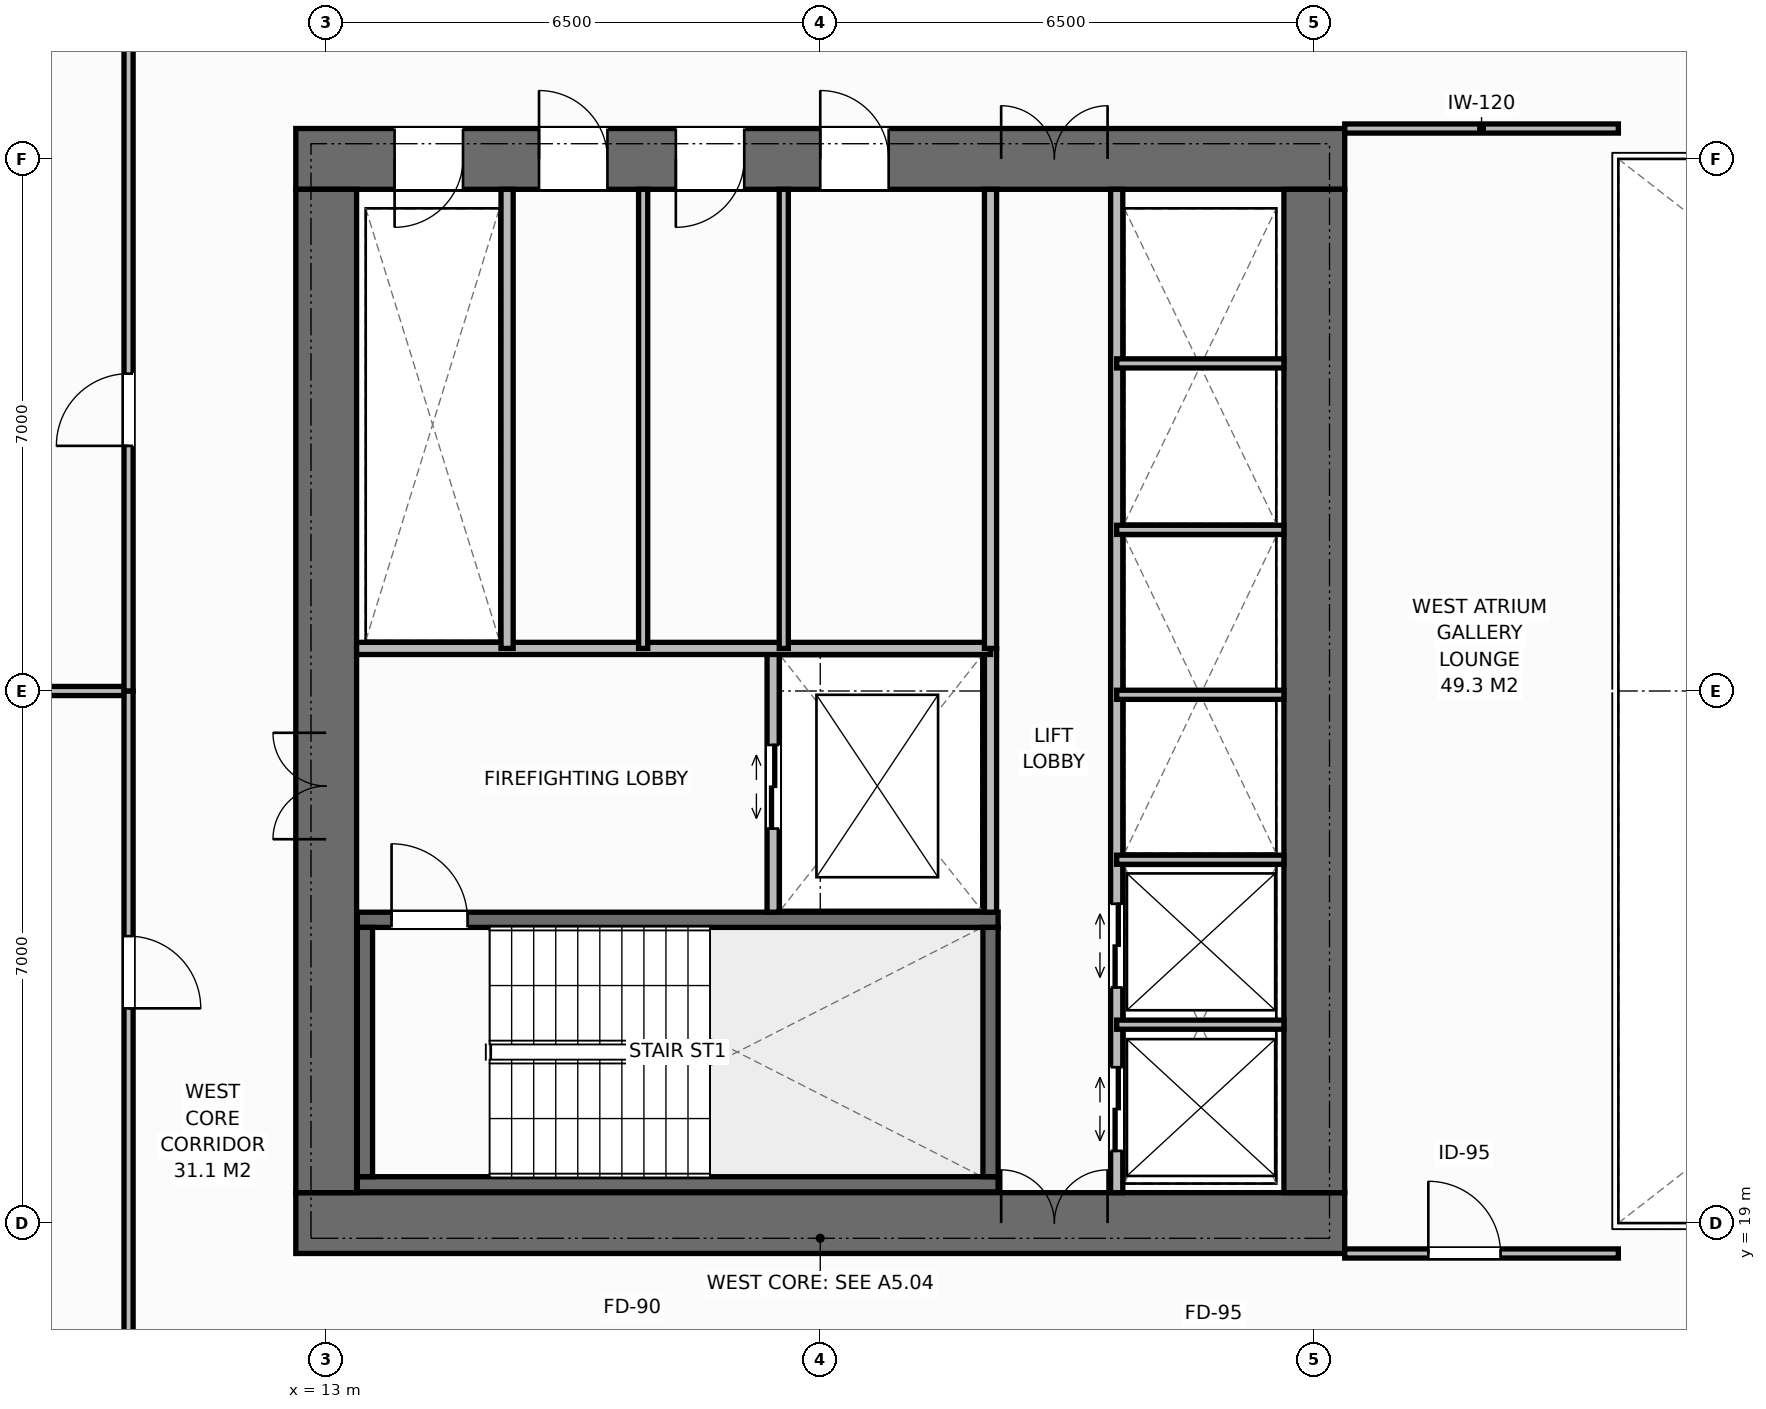
"""IFC4 building model, lengths in metres.
Left out: names, types, materials, properties, quantities, classifications, styles, units other than length and angle.
Written with IfcOpenShell. Run it as: python <this file> out.ifc"""

import sys

from ifc_helpers import new_model, si_unit, direction, frame, frame_2d, origin, place, context, subcontext, project, spatial, rectangle, extrude, element, fill, save


model = new_model("IFC4")
c1 = context("Model", 3, precision=1e-05, world=origin(), true_north=direction((0.0, 1.0)))
c2 = subcontext(c1, "Body", "Model", "MODEL_VIEW")
j1 = project(units=[si_unit("LENGTHUNIT", "METRE"), si_unit("PLANEANGLEUNIT", "RADIAN")], contexts=[c1])
p1 = place(None, origin())
s1 = spatial("IfcSite", under=j1, at=p1, CompositionType="ELEMENT")
p2 = place(p1, origin())
s2 = spatial("IfcBuilding", under=s1, at=p2, CompositionType="ELEMENT")
p3 = place(p2, frame((0.0, 0.0, 43.0)))
s3 = spatial("IfcBuildingStorey", under=s2, at=p3, CompositionType="ELEMENT", Elevation=43.0)
p4 = place(p3, frame((12.6, 19.0, 0.0), z_axis=(0.0, 0.0, 1.0), x_axis=(1.0, 0.0, 0.0)))
e1 = element("IfcWall", 1, at=p4, inside=s3, PredefinedType="SHEAR", context=c2, shape_type="SweptSolid", body=[
    extrude(rectangle(XDim=13.8, YDim=0.8, at=frame_2d((6.9, 0.0))), origin(), (0.0, 0.0, 1.0), 3.8),
])
p5 = place(p4, frame((9.28, 0.0, 0.0)))
e2 = element("IfcOpeningElement", 2, at=p5, cuts=e1, PredefinedType="OPENING", context=c2, shape_type="SweptSolid", body=[
    extrude(rectangle(XDim=1.4, YDim=2.2, at=frame_2d((0.7, 1.1))), frame((0.0, 0.41, 0.0), z_axis=(0.0, -1.0, 0.0), x_axis=(1.0, 0.0, 0.0)), (0.0, 0.0, 1.0), 0.82),
])
p6 = place(p3, frame((12.6, 33.0, 0.0), z_axis=(0.0, 0.0, 1.0), x_axis=(1.0, 0.0, 0.0)))
e3 = element("IfcWall", 3, at=p6, inside=s3, PredefinedType="SHEAR", context=c2, shape_type="SweptSolid", body=[
    extrude(rectangle(XDim=13.8, YDim=0.8, at=frame_2d((6.9, 0.0))), origin(), (0.0, 0.0, 1.0), 3.8),
])
p7 = place(p6, frame((1.3, 0.0, 0.0)))
e4 = element("IfcOpeningElement", 4, at=p7, cuts=e3, PredefinedType="OPENING", context=c2, shape_type="SweptSolid", body=[
    extrude(rectangle(XDim=0.9, YDim=2.15, at=frame_2d((0.45, 1.075))), frame((0.0, 0.41, 0.0), z_axis=(0.0, -1.0, 0.0), x_axis=(1.0, 0.0, 0.0)), (0.0, 0.0, 1.0), 0.82),
])
p8 = place(p6, frame((3.2, 0.0, 0.0)))
e5 = element("IfcOpeningElement", 5, at=p8, cuts=e3, PredefinedType="OPENING", context=c2, shape_type="SweptSolid", body=[
    extrude(rectangle(XDim=0.9, YDim=2.15, at=frame_2d((0.45, 1.075))), frame((0.0, 0.41, 0.0), z_axis=(0.0, -1.0, 0.0), x_axis=(1.0, 0.0, 0.0)), (0.0, 0.0, 1.0), 0.82),
])
p9 = place(p6, frame((5.0, 0.0, 0.0)))
e6 = element("IfcOpeningElement", 6, at=p9, cuts=e3, PredefinedType="OPENING", context=c2, shape_type="SweptSolid", body=[
    extrude(rectangle(XDim=0.9, YDim=2.15, at=frame_2d((0.45, 1.075))), frame((0.0, 0.41, 0.0), z_axis=(0.0, -1.0, 0.0), x_axis=(1.0, 0.0, 0.0)), (0.0, 0.0, 1.0), 0.82),
])
p10 = place(p6, frame((6.9, 0.0, 0.0)))
e7 = element("IfcOpeningElement", 7, at=p10, cuts=e3, PredefinedType="OPENING", context=c2, shape_type="SweptSolid", body=[
    extrude(rectangle(XDim=0.9, YDim=2.15, at=frame_2d((0.45, 1.075))), frame((0.0, 0.41, 0.0), z_axis=(0.0, -1.0, 0.0), x_axis=(1.0, 0.0, 0.0)), (0.0, 0.0, 1.0), 0.82),
])
p11 = place(p6, frame((9.28, 0.0, 0.0)))
e8 = element("IfcOpeningElement", 8, at=p11, cuts=e3, PredefinedType="OPENING", context=c2, shape_type="SweptSolid", body=[
    extrude(rectangle(XDim=1.4, YDim=2.2, at=frame_2d((0.7, 1.1))), frame((0.0, 0.41, 0.0), z_axis=(0.0, -1.0, 0.0), x_axis=(1.0, 0.0, 0.0)), (0.0, 0.0, 1.0), 0.82),
])
p12 = place(p3, frame((13.0, 19.4, 0.0), z_axis=(0.0, 0.0, 1.0), x_axis=(0.0, 1.0, 0.0)))
e9 = element("IfcWall", 9, at=p12, inside=s3, PredefinedType="SHEAR", context=c2, shape_type="SweptSolid", body=[
    extrude(rectangle(XDim=13.2, YDim=0.8, at=frame_2d((6.6, 0.0))), origin(), (0.0, 0.0, 1.0), 3.8),
])
p13 = place(p12, frame((4.65, 0.0, 0.0)))
e10 = element("IfcOpeningElement", 10, at=p13, cuts=e9, PredefinedType="OPENING", context=c2, shape_type="SweptSolid", body=[
    extrude(rectangle(XDim=1.4, YDim=2.2, at=frame_2d((0.7, 1.1))), frame((0.0, 0.41, 0.0), z_axis=(0.0, -1.0, 0.0), x_axis=(1.0, 0.0, 0.0)), (0.0, 0.0, 1.0), 0.82),
])
p14 = place(p3, frame((26.0, 19.4, 0.0), z_axis=(0.0, 0.0, 1.0), x_axis=(0.0, 1.0, 0.0)))
e11 = element("IfcWall", 11, at=p14, inside=s3, PredefinedType="SHEAR", context=c2, shape_type="SweptSolid", body=[
    extrude(rectangle(XDim=13.2, YDim=0.8, at=frame_2d((6.6, 0.0))), origin(), (0.0, 0.0, 1.0), 3.8),
])
p15 = place(p3, frame((13.41, 19.51, 0.0), z_axis=(0.0, 0.0, 1.0), x_axis=(1.0, 0.0, 0.0)))
e12 = element("IfcWall", 12, at=p15, inside=s3, PredefinedType="SHEAR", context=c2, shape_type="SweptSolid", body=[
    extrude(rectangle(XDim=8.43, YDim=0.2, at=frame_2d((4.215, 0.0))), origin(), (0.0, 0.0, 1.0), 3.8),
])
p16 = place(p3, frame((13.41, 22.99, 0.0), z_axis=(0.0, 0.0, 1.0), x_axis=(1.0, 0.0, 0.0)))
e13 = element("IfcWall", 13, at=p16, inside=s3, PredefinedType="SHEAR", context=c2, shape_type="SweptSolid", body=[
    extrude(rectangle(XDim=8.43, YDim=0.2, at=frame_2d((4.215, 0.0))), origin(), (0.0, 0.0, 1.0), 3.8),
])
p17 = place(p16, frame((0.45, 0.0, 0.0)))
e14 = element("IfcOpeningElement", 14, at=p17, cuts=e13, PredefinedType="OPENING", context=c2, shape_type="SweptSolid", body=[
    extrude(rectangle(XDim=1.0, YDim=2.15, at=frame_2d((0.5, 1.075))), frame((0.0, 0.11, 0.0), z_axis=(0.0, -1.0, 0.0), x_axis=(1.0, 0.0, 0.0)), (0.0, 0.0, 1.0), 0.22),
])
for number, where, z_axis, x_axis in (
    (15, (13.51, 19.61, 0.0), (0.0, 0.0, 1.0), (0.0, 1.0, 0.0)),
    (16, (21.74, 19.61, 0.0), (0.0, 0.0, 1.0), (0.0, 1.0, 0.0)),
):
    element("IfcWall", number, at=place(p3, frame(where, z_axis=z_axis, x_axis=x_axis)), inside=s3, PredefinedType="SHEAR", context=c2, shape_type="SweptSolid", body=[
        extrude(rectangle(XDim=3.28, YDim=0.2, at=frame_2d((1.64, 0.0))), origin(), (0.0, 0.0, 1.0), 3.8),
    ])
p18 = place(p3, frame((21.74, 23.09, 0.0), z_axis=(0.0, 0.0, 1.0), x_axis=(0.0, 1.0, 0.0)))
e17 = element("IfcWall", 17, at=p18, inside=s3, PredefinedType="STANDARD", context=c2, shape_type="SweptSolid", body=[
    extrude(rectangle(XDim=3.47, YDim=0.16, at=frame_2d((1.735, 0.0))), origin(), (0.0, 0.0, 1.0), 3.55),
])
p19 = place(p3, frame((18.88, 23.09, 0.0), z_axis=(0.0, 0.0, 1.0), x_axis=(0.0, 1.0, 0.0)))
e18 = element("IfcWall", 18, at=p19, inside=s3, PredefinedType="STANDARD", context=c2, shape_type="SweptSolid", body=[
    extrude(rectangle(XDim=3.47, YDim=0.16, at=frame_2d((1.735, 0.0))), origin(), (0.0, 0.0, 1.0), 3.55),
])
p20 = place(p19, frame((1.1, 0.0, 0.0)))
e19 = element("IfcOpeningElement", 19, at=p20, cuts=e18, PredefinedType="OPENING", context=c2, shape_type="SweptSolid", body=[
    extrude(rectangle(XDim=1.1, YDim=2.2, at=frame_2d((0.55, 1.1))), frame((0.0, 0.09, 0.0), z_axis=(0.0, -1.0, 0.0), x_axis=(1.0, 0.0, 0.0)), (0.0, 0.0, 1.0), 0.18),
])
p21 = place(p3, frame((13.4, 26.56, 0.0), z_axis=(0.0, 0.0, 1.0), x_axis=(1.0, 0.0, 0.0)))
e20 = element("IfcWall", 20, at=p21, inside=s3, PredefinedType="STANDARD", context=c2, shape_type="SweptSolid", body=[
    extrude(rectangle(XDim=8.34, YDim=0.16, at=frame_2d((4.17, 0.0))), origin(), (0.0, 0.0, 1.0), 3.55),
])
p22 = place(p3, frame((15.38, 26.56, 0.0), z_axis=(0.0, 0.0, 1.0), x_axis=(0.0, 1.0, 0.0)))
e21 = element("IfcWall", 21, at=p22, inside=s3, PredefinedType="STANDARD", context=c2, shape_type="SweptSolid", body=[
    extrude(rectangle(XDim=6.04, YDim=0.16, at=frame_2d((3.02, 0.0))), origin(), (0.0, 0.0, 1.0), 3.55),
])
for number, where, z_axis, x_axis in (
    (22, (17.17, 26.56, 0.0), (0.0, 0.0, 1.0), (0.0, 1.0, 0.0)),
    (23, (19.02, 26.56, 0.0), (0.0, 0.0, 1.0), (0.0, 1.0, 0.0)),
):
    element("IfcWall", number, at=place(p3, frame(where, z_axis=z_axis, x_axis=x_axis)), inside=s3, PredefinedType="PARTITIONING", context=c2, shape_type="SweptSolid", body=[
        extrude(rectangle(XDim=6.04, YDim=0.12, at=frame_2d((3.02, 0.0))), origin(), (0.0, 0.0, 1.0), 3.55),
    ])
p23 = place(p3, frame((21.74, 26.56, 0.0), z_axis=(0.0, 0.0, 1.0), x_axis=(0.0, 1.0, 0.0)))
e24 = element("IfcWall", 24, at=p23, inside=s3, PredefinedType="STANDARD", context=c2, shape_type="SweptSolid", body=[
    extrude(rectangle(XDim=6.04, YDim=0.16, at=frame_2d((3.02, 0.0))), origin(), (0.0, 0.0, 1.0), 3.55),
])
p24 = place(p3, frame((23.4, 19.4, 0.0), z_axis=(0.0, 0.0, 1.0), x_axis=(0.0, 1.0, 0.0)))
e25 = element("IfcWall", 25, at=p24, inside=s3, PredefinedType="STANDARD", context=c2, shape_type="SweptSolid", body=[
    extrude(rectangle(XDim=13.2, YDim=0.16, at=frame_2d((6.6, 0.0))), origin(), (0.0, 0.0, 1.0), 3.55),
])
p25 = place(p24, frame((0.55, 0.0, 0.0)))
e26 = element("IfcOpeningElement", 26, at=p25, cuts=e25, PredefinedType="OPENING", context=c2, shape_type="SweptSolid", body=[
    extrude(rectangle(XDim=1.1, YDim=2.2, at=frame_2d((0.55, 1.1))), frame((0.0, 0.09, 0.0), z_axis=(0.0, -1.0, 0.0), x_axis=(1.0, 0.0, 0.0)), (0.0, 0.0, 1.0), 0.18),
])
p26 = place(p24, frame((2.7, 0.0, 0.0)))
e27 = element("IfcOpeningElement", 27, at=p26, cuts=e25, PredefinedType="OPENING", context=c2, shape_type="SweptSolid", body=[
    extrude(rectangle(XDim=1.1, YDim=2.2, at=frame_2d((0.55, 1.1))), frame((0.0, 0.09, 0.0), z_axis=(0.0, -1.0, 0.0), x_axis=(1.0, 0.0, 0.0)), (0.0, 0.0, 1.0), 0.18),
])
for number, where, z_axis, x_axis in (
    (28, (23.4, 21.61, 0.0), (0.0, 0.0, 1.0), (1.0, 0.0, 0.0)),
    (29, (23.4, 23.78, 0.0), (0.0, 0.0, 1.0), (1.0, 0.0, 0.0)),
    (30, (23.4, 25.95, 0.0), (0.0, 0.0, 1.0), (1.0, 0.0, 0.0)),
    (31, (23.4, 28.12, 0.0), (0.0, 0.0, 1.0), (1.0, 0.0, 0.0)),
    (32, (23.4, 30.31, 0.0), (0.0, 0.0, 1.0), (1.0, 0.0, 0.0)),
):
    element("IfcWall", number, at=place(p3, frame(where, z_axis=z_axis, x_axis=x_axis)), inside=s3, PredefinedType="PARTITIONING", context=c2, shape_type="SweptSolid", body=[
        extrude(rectangle(XDim=2.2, YDim=0.12, at=frame_2d((1.1, 0.0))), origin(), (0.0, 0.0, 1.0), 3.55),
    ])
p27 = place(p3, frame((26.4, 33.4, 0.0), z_axis=(0.0, 0.0, 1.0), x_axis=(1.0, 0.0, 0.0)))
e33 = element("IfcWall", 33, at=p27, inside=s3, PredefinedType="PARTITIONING", context=c2, shape_type="SweptSolid", body=[
    extrude(rectangle(XDim=3.6, YDim=0.12, at=frame_2d((1.8, 0.0))), origin(), (0.0, 0.0, 1.0), 3.55),
])
p28 = place(p3, frame((26.4, 18.6, 0.0), z_axis=(0.0, 0.0, 1.0), x_axis=(1.0, 0.0, 0.0)))
e34 = element("IfcWall", 34, at=p28, inside=s3, PredefinedType="PARTITIONING", context=c2, shape_type="SweptSolid", body=[
    extrude(rectangle(XDim=3.6, YDim=0.12, at=frame_2d((1.8, 0.0))), origin(), (0.0, 0.0, 1.0), 3.55),
])
p29 = place(p28, frame((1.1, 0.0, 0.0)))
e35 = element("IfcOpeningElement", 35, at=p29, cuts=e34, PredefinedType="OPENING", context=c2, shape_type="SweptSolid", body=[
    extrude(rectangle(XDim=0.95, YDim=2.15, at=frame_2d((0.475, 1.075))), frame((0.0, 0.07, 0.0), z_axis=(0.0, -1.0, 0.0), x_axis=(1.0, 0.0, 0.0)), (0.0, 0.0, 1.0), 0.14),
])
p30 = place(p3, frame((-0.18, 26.0, 0.0), z_axis=(0.0, 0.0, 1.0), x_axis=(1.0, 0.0, 0.0)))
e36 = element("IfcWall", 36, at=p30, inside=s3, PredefinedType="PARTITIONING", context=c2, shape_type="SweptSolid", body=[
    extrude(rectangle(XDim=10.58, YDim=0.12, at=frame_2d((5.29, 0.0))), origin(), (0.0, 0.0, 1.0), 3.55),
])
p31 = place(p3, frame((10.4, 16.5, 0.0), z_axis=(0.0, 0.0, 1.0), x_axis=(0.0, 1.0, 0.0)))
e37 = element("IfcWall", 37, at=p31, inside=s3, PredefinedType="PARTITIONING", context=c2, shape_type="SweptSolid", body=[
    extrude(rectangle(XDim=9.5, YDim=0.12, at=frame_2d((4.75, 0.0))), origin(), (0.0, 0.0, 1.0), 3.55),
])
p32 = place(p31, frame((5.325, 0.0, 0.0)))
e38 = element("IfcOpeningElement", 38, at=p32, cuts=e37, PredefinedType="OPENING", context=c2, shape_type="SweptSolid", body=[
    extrude(rectangle(XDim=0.95, YDim=2.15, at=frame_2d((0.475, 1.075))), frame((0.0, 0.07, 0.0), z_axis=(0.0, -1.0, 0.0), x_axis=(1.0, 0.0, 0.0)), (0.0, 0.0, 1.0), 0.14),
])
p33 = place(p3, frame((10.4, 26.0, 0.0), z_axis=(0.0, 0.0, 1.0), x_axis=(0.0, 1.0, 0.0)))
e39 = element("IfcWall", 39, at=p33, inside=s3, PredefinedType="PARTITIONING", context=c2, shape_type="SweptSolid", body=[
    extrude(rectangle(XDim=9.5, YDim=0.12, at=frame_2d((4.75, 0.0))), origin(), (0.0, 0.0, 1.0), 3.55),
])
p34 = place(p33, frame((3.225, 0.0, 0.0)))
e40 = element("IfcOpeningElement", 40, at=p34, cuts=e39, PredefinedType="OPENING", context=c2, shape_type="SweptSolid", body=[
    extrude(rectangle(XDim=0.95, YDim=2.15, at=frame_2d((0.475, 1.075))), frame((0.0, 0.07, 0.0), z_axis=(0.0, -1.0, 0.0), x_axis=(1.0, 0.0, 0.0)), (0.0, 0.0, 1.0), 0.14),
])
p35 = place(p17, origin())
e41 = element("IfcDoor", 41, at=p35, inside=s3, OperationType="SINGLE_SWING_LEFT", PredefinedType="DOOR", context=c2, shape_type="SweptSolid", body=[
    extrude(rectangle(XDim=1.0, YDim=2.15, at=frame_2d((0.5, 1.075))), frame((0.0, 0.025, 0.0), z_axis=(0.0, -1.0, 0.0), x_axis=(1.0, 0.0, 0.0)), (0.0, 0.0, 1.0), 0.05),
])
fill(e14, e41)
p36 = place(p13, origin())
e42 = element("IfcDoor", 42, at=p36, inside=s3, OperationType="DOUBLE_DOOR_SINGLE_SWING", PredefinedType="DOOR", context=c2, shape_type="SweptSolid", body=[
    extrude(rectangle(XDim=1.4, YDim=2.2, at=frame_2d((0.7, 1.1))), frame((0.0, 0.025, 0.0), z_axis=(0.0, -1.0, 0.0), x_axis=(1.0, 0.0, 0.0)), (0.0, 0.0, 1.0), 0.05),
])
fill(e10, e42)
p37 = place(p20, origin())
e43 = element("IfcDoor", 43, at=p37, inside=s3, OperationType="DOUBLE_DOOR_SLIDING", PredefinedType="DOOR", context=c2, shape_type="SweptSolid", body=[
    extrude(rectangle(XDim=1.1, YDim=2.2, at=frame_2d((0.55, 1.1))), frame((0.0, 0.025, 0.0), z_axis=(0.0, -1.0, 0.0), x_axis=(1.0, 0.0, 0.0)), (0.0, 0.0, 1.0), 0.05),
])
fill(e19, e43)
p38 = place(p7, origin())
e44 = element("IfcDoor", 44, at=p38, inside=s3, OperationType="SINGLE_SWING_RIGHT", PredefinedType="DOOR", context=c2, shape_type="SweptSolid", body=[
    extrude(rectangle(XDim=0.9, YDim=2.15, at=frame_2d((0.45, 1.075))), frame((0.0, -0.075, 0.0), z_axis=(0.0, -1.0, 0.0), x_axis=(1.0, 0.0, 0.0)), (0.0, 0.0, 1.0), 0.05),
])
fill(e4, e44)
p39 = place(p8, origin())
e45 = element("IfcDoor", 45, at=p39, inside=s3, OperationType="SINGLE_SWING_LEFT", PredefinedType="DOOR", context=c2, shape_type="SweptSolid", body=[
    extrude(rectangle(XDim=0.9, YDim=2.15, at=frame_2d((0.45, 1.075))), frame((0.0, -0.075, 0.0), z_axis=(0.0, -1.0, 0.0), x_axis=(1.0, 0.0, 0.0)), (0.0, 0.0, 1.0), 0.05),
])
fill(e5, e45)
p40 = place(p9, origin())
e46 = element("IfcDoor", 46, at=p40, inside=s3, OperationType="SINGLE_SWING_RIGHT", PredefinedType="DOOR", context=c2, shape_type="SweptSolid", body=[
    extrude(rectangle(XDim=0.9, YDim=2.15, at=frame_2d((0.45, 1.075))), frame((0.0, -0.075, 0.0), z_axis=(0.0, -1.0, 0.0), x_axis=(1.0, 0.0, 0.0)), (0.0, 0.0, 1.0), 0.05),
])
fill(e6, e46)
p41 = place(p10, origin())
e47 = element("IfcDoor", 47, at=p41, inside=s3, OperationType="SINGLE_SWING_LEFT", PredefinedType="DOOR", context=c2, shape_type="SweptSolid", body=[
    extrude(rectangle(XDim=0.9, YDim=2.15, at=frame_2d((0.45, 1.075))), frame((0.0, -0.075, 0.0), z_axis=(0.0, -1.0, 0.0), x_axis=(1.0, 0.0, 0.0)), (0.0, 0.0, 1.0), 0.05),
])
fill(e7, e47)
p42 = place(p5, origin())
e48 = element("IfcDoor", 48, at=p42, inside=s3, OperationType="DOUBLE_DOOR_SINGLE_SWING", PredefinedType="DOOR", context=c2, shape_type="SweptSolid", body=[
    extrude(rectangle(XDim=1.4, YDim=2.2, at=frame_2d((0.7, 1.1))), frame((0.0, 0.125, 0.0), z_axis=(0.0, -1.0, 0.0), x_axis=(1.0, 0.0, 0.0)), (0.0, 0.0, 1.0), 0.05),
])
fill(e2, e48)
p43 = place(p11, origin())
e49 = element("IfcDoor", 49, at=p43, inside=s3, OperationType="DOUBLE_DOOR_SINGLE_SWING", PredefinedType="DOOR", context=c2, shape_type="SweptSolid", body=[
    extrude(rectangle(XDim=1.4, YDim=2.2, at=frame_2d((0.7, 1.1))), frame((0.0, -0.075, 0.0), z_axis=(0.0, -1.0, 0.0), x_axis=(1.0, 0.0, 0.0)), (0.0, 0.0, 1.0), 0.05),
])
fill(e8, e49)
p44 = place(p25, origin())
e50 = element("IfcDoor", 50, at=p44, inside=s3, OperationType="DOUBLE_DOOR_SLIDING", PredefinedType="DOOR", context=c2, shape_type="SweptSolid", body=[
    extrude(rectangle(XDim=1.1, YDim=2.2, at=frame_2d((0.55, 1.1))), frame((0.0, 0.025, 0.0), z_axis=(0.0, -1.0, 0.0), x_axis=(1.0, 0.0, 0.0)), (0.0, 0.0, 1.0), 0.05),
])
fill(e26, e50)
p45 = place(p26, origin())
e51 = element("IfcDoor", 51, at=p45, inside=s3, OperationType="DOUBLE_DOOR_SLIDING", PredefinedType="DOOR", context=c2, shape_type="SweptSolid", body=[
    extrude(rectangle(XDim=1.1, YDim=2.2, at=frame_2d((0.55, 1.1))), frame((0.0, 0.025, 0.0), z_axis=(0.0, -1.0, 0.0), x_axis=(1.0, 0.0, 0.0)), (0.0, 0.0, 1.0), 0.05),
])
fill(e27, e51)
p46 = place(p29, origin())
e52 = element("IfcDoor", 52, at=p46, inside=s3, OperationType="SINGLE_SWING_LEFT", PredefinedType="DOOR", context=c2, shape_type="SweptSolid", body=[
    extrude(rectangle(XDim=0.95, YDim=2.15, at=frame_2d((0.475, 1.075))), frame((0.0, 0.025, 0.0), z_axis=(0.0, -1.0, 0.0), x_axis=(1.0, 0.0, 0.0)), (0.0, 0.0, 1.0), 0.05),
])
fill(e35, e52)
p47 = place(p32, origin())
e53 = element("IfcDoor", 53, at=p47, inside=s3, OperationType="SINGLE_SWING_RIGHT", PredefinedType="DOOR", context=c2, shape_type="SweptSolid", body=[
    extrude(rectangle(XDim=0.95, YDim=2.15, at=frame_2d((0.475, 1.075))), frame((0.0, 0.025, 0.0), z_axis=(0.0, -1.0, 0.0), x_axis=(1.0, 0.0, 0.0)), (0.0, 0.0, 1.0), 0.05),
])
fill(e38, e53)
p48 = place(p34, origin())
e54 = element("IfcDoor", 54, at=p48, inside=s3, OperationType="SINGLE_SWING_LEFT", PredefinedType="DOOR", context=c2, shape_type="SweptSolid", body=[
    extrude(rectangle(XDim=0.95, YDim=2.15, at=frame_2d((0.475, 1.075))), frame((0.0, 0.025, 0.0), z_axis=(0.0, -1.0, 0.0), x_axis=(1.0, 0.0, 0.0)), (0.0, 0.0, 1.0), 0.05),
])
fill(e40, e54)
save(model, sys.argv[1])
